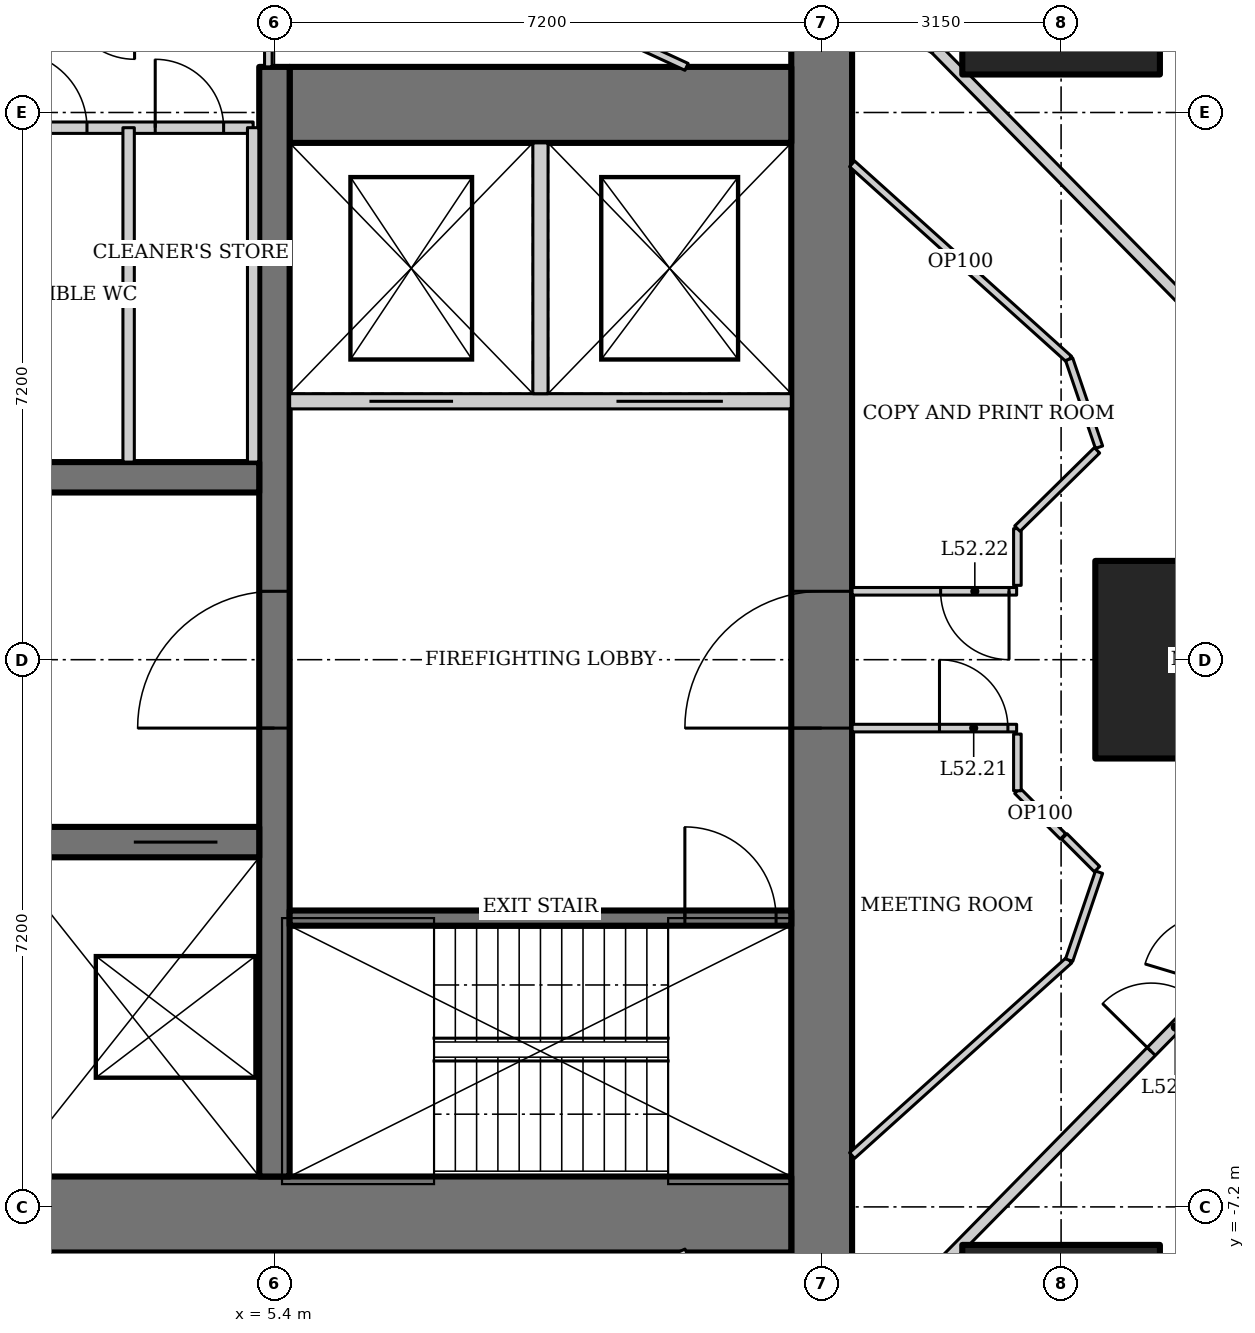
"""IFC4 building model, lengths in metres.
Left out: names, types, materials, properties, quantities, classifications, styles, units other than length and angle.
Written with IfcOpenShell. Run it as: python <this file> out.ifc"""

import sys

from ifc_helpers import new_model, si_unit, direction, frame, frame_2d, origin, origin_2d, place, context, subcontext, project, spatial, rectangle, hollow_rectangle, extrude, element, fill, save


model = new_model("IFC4")
c1 = context("Model", 3, precision=1e-05, world=origin(), true_north=direction((0.0, 1.0)))
c2 = subcontext(c1, "Body", "Model", "MODEL_VIEW")
j1 = project(units=[si_unit("LENGTHUNIT", "METRE"), si_unit("PLANEANGLEUNIT", "RADIAN")], contexts=[c1])
p1 = place(None, origin())
s1 = spatial("IfcSite", under=j1, at=p1, CompositionType="ELEMENT")
p2 = place(p1, origin())
s2 = spatial("IfcBuilding", under=s1, at=p2, CompositionType="ELEMENT")
p3 = place(p2, frame((0.0, 0.0, 224.2)))
s3 = spatial("IfcBuildingStorey", under=s2, at=p3, CompositionType="ELEMENT", Elevation=224.2)
for number, where, z_axis, x_axis in (
    (1, (17.5, 0.0, 0.0), (0.0, 0.0, 1.0), (1.0, 0.0, 0.0)),
    (2, (15.75, 9.0, 0.0), (0.0, 0.0, 1.0), (1.0, 0.0, 0.0)),
    (3, (15.75, -9.0, 0.0), (0.0, 0.0, 1.0), (1.0, 0.0, 0.0)),
):
    element("IfcColumn", number, at=place(p3, frame(where, z_axis=z_axis, x_axis=x_axis)), inside=s3, PredefinedType="COLUMN", context=c2, shape_type="SweptSolid", body=[
        extrude(hollow_rectangle(XDim=2.6, YDim=2.6, WallThickness=0.13, at=origin_2d()), origin(), (0.0, 0.0, 1.0), 4.2),
    ])
p4 = place(p3, frame((12.6, -13.0, 0.0), z_axis=(0.0, 0.0, 1.0), x_axis=(0.0, 1.0, 0.0)))
e4 = element("IfcWall", 4, at=p4, inside=s3, PredefinedType="SHEAR", context=c2, shape_type="SweptSolid", body=[
    extrude(rectangle(XDim=26.0, YDim=0.8, at=frame_2d((13.0, 0.0))), origin(), (0.0, 0.0, 1.0), 4.2),
])
p5 = place(p4, frame((12.1, 0.0, 0.0)))
e5 = element("IfcOpeningElement", 5, at=p5, cuts=e4, PredefinedType="OPENING", context=c2, shape_type="SweptSolid", body=[
    extrude(rectangle(XDim=1.8, YDim=2.1, at=frame_2d((0.9, 1.05))), frame((0.0, 0.41, 0.0), z_axis=(0.0, -1.0, 0.0), x_axis=(1.0, 0.0, 0.0)), (0.0, 0.0, 1.0), 0.82),
])
p6 = place(p3, frame((-12.2, -7.3, 0.0), z_axis=(0.0, 0.0, 1.0), x_axis=(1.0, 0.0, 0.0)))
e6 = element("IfcWall", 6, at=p6, inside=s3, PredefinedType="SHEAR", context=c2, shape_type="SweptSolid", body=[
    extrude(rectangle(XDim=24.4, YDim=1.0, at=frame_2d((12.2, 0.0))), origin(), (0.0, 0.0, 1.0), 4.2),
])
p7 = place(p3, frame((12.2, 7.3, 0.0), z_axis=(0.0, 0.0, 1.0), x_axis=(-1.0, 0.0, 0.0)))
e7 = element("IfcWall", 7, at=p7, inside=s3, PredefinedType="SHEAR", context=c2, shape_type="SweptSolid", body=[
    extrude(rectangle(XDim=6.6, YDim=1.0, at=frame_2d((3.3, 0.0))), origin(), (0.0, 0.0, 1.0), 4.2),
])
p8 = place(p3, frame((5.4, -6.8, 0.0), z_axis=(0.0, 0.0, 1.0), x_axis=(0.0, 1.0, 0.0)))
e8 = element("IfcWall", 8, at=p8, inside=s3, PredefinedType="SHEAR", context=c2, shape_type="SweptSolid", body=[
    extrude(rectangle(XDim=14.6, YDim=0.4, at=frame_2d((7.3, 0.0))), origin(), (0.0, 0.0, 1.0), 4.2),
])
p9 = place(p8, frame((5.9, 0.0, 0.0)))
e9 = element("IfcOpeningElement", 9, at=p9, cuts=e8, PredefinedType="OPENING", context=c2, shape_type="SweptSolid", body=[
    extrude(rectangle(XDim=1.8, YDim=2.1, at=frame_2d((0.9, 1.05))), frame((0.0, 0.21, 0.0), z_axis=(0.0, -1.0, 0.0), x_axis=(1.0, 0.0, 0.0)), (0.0, 0.0, 1.0), 0.42),
])
p10 = place(p3, frame((-5.2, -2.4, 0.0), z_axis=(0.0, 0.0, 1.0), x_axis=(1.0, 0.0, 0.0)))
e10 = element("IfcWall", 10, at=p10, inside=s3, PredefinedType="SHEAR", context=c2, shape_type="SweptSolid", body=[
    extrude(rectangle(XDim=10.4, YDim=0.4, at=frame_2d((5.2, 0.0))), origin(), (0.0, 0.0, 1.0), 4.2),
])
p11 = place(p10, frame((1.683, 0.0, 0.0)))
e11 = element("IfcOpeningElement", 11, at=p11, cuts=e10, PredefinedType="OPENING", context=c2, shape_type="SweptSolid", body=[
    extrude(rectangle(XDim=1.1, YDim=2.2, at=frame_2d((0.55, 1.1))), frame((0.0, 0.21, 0.0), z_axis=(0.0, -1.0, 0.0), x_axis=(1.0, 0.0, 0.0)), (0.0, 0.0, 1.0), 0.42),
])
p12 = place(p10, frame((5.217, 0.0, 0.0)))
e12 = element("IfcOpeningElement", 12, at=p12, cuts=e10, PredefinedType="OPENING", context=c2, shape_type="SweptSolid", body=[
    extrude(rectangle(XDim=1.1, YDim=2.2, at=frame_2d((0.55, 1.1))), frame((0.0, 0.21, 0.0), z_axis=(0.0, -1.0, 0.0), x_axis=(1.0, 0.0, 0.0)), (0.0, 0.0, 1.0), 0.42),
])
p13 = place(p10, frame((8.75, 0.0, 0.0)))
e13 = element("IfcOpeningElement", 13, at=p13, cuts=e10, PredefinedType="OPENING", context=c2, shape_type="SweptSolid", body=[
    extrude(rectangle(XDim=1.1, YDim=2.2, at=frame_2d((0.55, 1.1))), frame((0.0, 0.21, 0.0), z_axis=(0.0, -1.0, 0.0), x_axis=(1.0, 0.0, 0.0)), (0.0, 0.0, 1.0), 0.42),
])
p14 = place(p3, frame((5.2, 2.4, 0.0), z_axis=(0.0, 0.0, 1.0), x_axis=(-1.0, 0.0, 0.0)))
e14 = element("IfcWall", 14, at=p14, inside=s3, PredefinedType="SHEAR", context=c2, shape_type="SweptSolid", body=[
    extrude(rectangle(XDim=10.4, YDim=0.4, at=frame_2d((5.2, 0.0))), origin(), (0.0, 0.0, 1.0), 4.2),
])
p15 = place(p3, frame((5.6, -3.4, 0.0), z_axis=(0.0, 0.0, 1.0), x_axis=(1.0, 0.0, 0.0)))
e15 = element("IfcWall", 15, at=p15, inside=s3, PredefinedType="SHEAR", context=c2, shape_type="SweptSolid", body=[
    extrude(rectangle(XDim=6.6, YDim=0.2, at=frame_2d((3.3, 0.0))), origin(), (0.0, 0.0, 1.0), 4.2),
])
p16 = place(p15, frame((5.2, 0.0, 0.0)))
e16 = element("IfcOpeningElement", 16, at=p16, cuts=e15, PredefinedType="OPENING", context=c2, shape_type="SweptSolid", body=[
    extrude(rectangle(XDim=1.2, YDim=2.1, at=frame_2d((0.6, 1.05))), frame((0.0, 0.11, 0.0), z_axis=(0.0, -1.0, 0.0), x_axis=(1.0, 0.0, 0.0)), (0.0, 0.0, 1.0), 0.22),
])
p17 = place(p3, frame((12.2, 3.4, 0.0), z_axis=(0.0, 0.0, 1.0), x_axis=(-1.0, 0.0, 0.0)))
e17 = element("IfcWall", 17, at=p17, inside=s3, PredefinedType="SOLIDWALL", context=c2, shape_type="SweptSolid", body=[
    extrude(rectangle(XDim=6.6, YDim=0.2, at=frame_2d((3.3, 0.0))), origin(), (0.0, 0.0, 1.0), 4.2),
])
p18 = place(p17, frame((4.45, 0.0, 0.0)))
e18 = element("IfcOpeningElement", 18, at=p18, cuts=e17, PredefinedType="OPENING", context=c2, shape_type="SweptSolid", body=[
    extrude(rectangle(XDim=1.1, YDim=2.2, at=frame_2d((0.55, 1.1))), frame((0.0, 0.11, 0.0), z_axis=(0.0, -1.0, 0.0), x_axis=(1.0, 0.0, 0.0)), (0.0, 0.0, 1.0), 0.22),
])
p19 = place(p17, frame((0.9, 0.0, 0.0)))
e19 = element("IfcOpeningElement", 19, at=p19, cuts=e17, PredefinedType="OPENING", context=c2, shape_type="SweptSolid", body=[
    extrude(rectangle(XDim=1.4, YDim=2.2, at=frame_2d((0.7, 1.1))), frame((0.0, 0.11, 0.0), z_axis=(0.0, -1.0, 0.0), x_axis=(1.0, 0.0, 0.0)), (0.0, 0.0, 1.0), 0.22),
])
p20 = place(p3, frame((8.9, 3.5, 0.0), z_axis=(0.0, 0.0, 1.0), x_axis=(0.0, 1.0, 0.0)))
e20 = element("IfcWall", 20, at=p20, inside=s3, PredefinedType="SOLIDWALL", context=c2, shape_type="SweptSolid", body=[
    extrude(rectangle(XDim=3.3, YDim=0.2, at=frame_2d((1.65, 0.0))), origin(), (0.0, 0.0, 1.0), 4.2),
])
p21 = place(p3, frame((17.673, 4.406, 0.0), z_axis=(0.0, 0.0, 1.0), x_axis=(-0.701111216625, 0.713051934941, 0.0)))
e21 = element("IfcWall", 21, at=p21, inside=s3, PredefinedType="PARTITIONING", context=c2, shape_type="SweptSolid", body=[
    extrude(rectangle(XDim=5.112, YDim=0.15, at=frame_2d((2.556, 0.0))), origin(), (0.0, 0.0, 1.0), 4.05),
])
p22 = place(p3, frame((14.089, 8.051, 0.0), z_axis=(0.0, 0.0, 1.0), x_axis=(-0.886174439647, 0.463351769735, 0.0)))
e22 = element("IfcWall", 22, at=p22, inside=s3, PredefinedType="PARTITIONING", context=c2, shape_type="SweptSolid", body=[
    extrude(rectangle(XDim=4.735, YDim=0.15, at=frame_2d((2.367, 0.0))), origin(), (0.0, 0.0, 1.0), 4.05),
])
p23 = place(p3, frame((14.089, -8.051, 0.0), z_axis=(0.0, 0.0, 1.0), x_axis=(0.701111216625, 0.713051934941, 0.0)))
e23 = element("IfcWall", 23, at=p23, inside=s3, PredefinedType="PARTITIONING", context=c2, shape_type="SweptSolid", body=[
    extrude(rectangle(XDim=5.112, YDim=0.15, at=frame_2d((2.556, 0.0))), origin(), (0.0, 0.0, 1.0), 4.05),
])
p24 = place(p23, frame((4.061, 0.0, 0.0)))
e24 = element("IfcOpeningElement", 24, at=p24, cuts=e23, PredefinedType="OPENING", context=c2, shape_type="SweptSolid", body=[
    extrude(rectangle(XDim=0.9, YDim=2.1, at=frame_2d((0.45, 1.05))), frame((0.0, 0.085, 0.0), z_axis=(0.0, -1.0, 0.0), x_axis=(1.0, 0.0, 0.0)), (0.0, 0.0, 1.0), 0.17),
])
p25 = place(p3, frame((-5.12, 7.0, 0.0), z_axis=(0.0, 0.0, 1.0), x_axis=(1.0, 0.0, 0.0)))
e25 = element("IfcWall", 25, at=p25, inside=s3, PredefinedType="SOLIDWALL", context=c2, shape_type="SweptSolid", body=[
    extrude(rectangle(XDim=10.24, YDim=0.15, at=frame_2d((5.12, 0.0))), origin(), (0.0, 0.0, 1.0), 4.05),
])
p26 = place(p25, frame((1.2, 0.0, 0.0)))
e26 = element("IfcOpeningElement", 26, at=p26, cuts=e25, PredefinedType="OPENING", context=c2, shape_type="SweptSolid", body=[
    extrude(rectangle(XDim=0.9, YDim=2.1, at=frame_2d((0.45, 1.05))), frame((0.0, 0.085, 0.0), z_axis=(0.0, -1.0, 0.0), x_axis=(1.0, 0.0, 0.0)), (0.0, 0.0, 1.0), 0.17),
])
p27 = place(p25, frame((4.477, 0.0, 0.0)))
e27 = element("IfcOpeningElement", 27, at=p27, cuts=e25, PredefinedType="OPENING", context=c2, shape_type="SweptSolid", body=[
    extrude(rectangle(XDim=0.9, YDim=2.1, at=frame_2d((0.45, 1.05))), frame((0.0, 0.085, 0.0), z_axis=(0.0, -1.0, 0.0), x_axis=(1.0, 0.0, 0.0)), (0.0, 0.0, 1.0), 0.17),
])
p28 = place(p25, frame((7.054, 0.0, 0.0)))
e28 = element("IfcOpeningElement", 28, at=p28, cuts=e25, PredefinedType="OPENING", context=c2, shape_type="SweptSolid", body=[
    extrude(rectangle(XDim=1.0, YDim=2.1, at=frame_2d((0.5, 1.05))), frame((0.0, 0.085, 0.0), z_axis=(0.0, -1.0, 0.0), x_axis=(1.0, 0.0, 0.0)), (0.0, 0.0, 1.0), 0.17),
])
p29 = place(p25, frame((8.952, 0.0, 0.0)))
e29 = element("IfcOpeningElement", 29, at=p29, cuts=e25, PredefinedType="OPENING", context=c2, shape_type="SweptSolid", body=[
    extrude(rectangle(XDim=0.9, YDim=2.1, at=frame_2d((0.45, 1.05))), frame((0.0, 0.085, 0.0), z_axis=(0.0, -1.0, 0.0), x_axis=(1.0, 0.0, 0.0)), (0.0, 0.0, 1.0), 0.17),
])
for number, where, z_axis, x_axis in (
    (30, (5.12, 2.6, 0.0), (0.0, 0.0, 1.0), (0.0, 1.0, 0.0)),
    (31, (3.482, 2.6, 0.0), (0.0, 0.0, 1.0), (0.0, 1.0, 0.0)),
):
    element("IfcWall", number, at=place(p3, frame(where, z_axis=z_axis, x_axis=x_axis)), inside=s3, PredefinedType="SOLIDWALL", context=c2, shape_type="SweptSolid", body=[
        extrude(rectangle(XDim=4.4, YDim=0.15, at=frame_2d((2.2, 0.0))), origin(), (0.0, 0.0, 1.0), 4.05),
    ])
p30 = place(p3, frame((10.823, -7.8, 0.0), z_axis=(0.0, 0.0, 1.0), x_axis=(-0.907759689292, -0.419490579748, 0.0)))
e32 = element("IfcWall", 32, at=p30, inside=s3, PredefinedType="PARTITIONING", context=c2, shape_type="SweptSolid", body=[
    extrude(rectangle(XDim=2.506, YDim=0.1, at=frame_2d((1.253, 0.0))), origin(), (0.0, 0.0, 1.0), 4.05),
])
for number, where, z_axis, x_axis in (
    (33, (15.856, -3.953, 0.0), (0.0, 0.0, 1.0), (-0.743, -0.669, 0.0)),
    (34, (13.0, 6.524, 0.0), (0.0, 0.0, 1.0), (0.743, -0.669, 0.0)),
):
    element("IfcWall", number, at=place(p3, frame(where, z_axis=z_axis, x_axis=x_axis)), inside=s3, PredefinedType="PARTITIONING", context=c2, shape_type="SweptSolid", body=[
        extrude(rectangle(XDim=3.843, YDim=0.1, at=frame_2d((1.921, 0.0))), origin(), (0.0, 0.0, 1.0), 4.05),
    ])
p31 = place(p3, frame((5.32, 7.8, 0.0), z_axis=(0.0, 0.0, 1.0), x_axis=(0.0, 1.0, 0.0)))
e35 = element("IfcWall", 35, at=p31, inside=s3, PredefinedType="PARTITIONING", context=c2, shape_type="SweptSolid", body=[
    extrude(rectangle(XDim=1.0, YDim=0.1, at=frame_2d((0.5, 0.0))), origin(), (0.0, 0.0, 1.0), 4.05),
])
p32 = place(p3, frame((8.548, 8.851, 0.0), z_axis=(0.0, 0.0, 1.0), x_axis=(0.907759689292, -0.419490579748, 0.0)))
e36 = element("IfcWall", 36, at=p32, inside=s3, PredefinedType="PARTITIONING", context=c2, shape_type="SweptSolid", body=[
    extrude(rectangle(XDim=2.506, YDim=0.1, at=frame_2d((1.253, 0.0))), origin(), (0.0, 0.0, 1.0), 4.05),
])
p33 = place(p3, frame((13.0, -0.9, 0.0), z_axis=(0.0, 0.0, 1.0), x_axis=(1.0, 0.0, 0.0)))
e37 = element("IfcWall", 37, at=p33, inside=s3, PredefinedType="PARTITIONING", context=c2, shape_type="SweptSolid", body=[
    extrude(rectangle(XDim=2.165, YDim=0.1, at=frame_2d((1.083, 0.0))), origin(), (0.0, 0.0, 1.0), 4.05),
])
p34 = place(p33, frame((1.15, 0.0, 0.0)))
e38 = element("IfcOpeningElement", 38, at=p34, cuts=e37, PredefinedType="OPENING", context=c2, shape_type="SweptSolid", body=[
    extrude(rectangle(XDim=0.9, YDim=2.1, at=frame_2d((0.45, 1.05))), frame((0.0, 0.06, 0.0), z_axis=(0.0, -1.0, 0.0), x_axis=(1.0, 0.0, 0.0)), (0.0, 0.0, 1.0), 0.12),
])
for number, where, z_axis, x_axis in (
    (39, (16.249, -2.796, 0.0), (0.0, 0.0, 1.0), (-0.322, -0.947, 0.0)),
    (40, (15.856, 3.953, 0.0), (0.0, 0.0, 1.0), (0.322, -0.947, 0.0)),
):
    element("IfcWall", number, at=place(p3, frame(where, z_axis=z_axis, x_axis=x_axis)), inside=s3, PredefinedType="PARTITIONING", context=c2, shape_type="SweptSolid", body=[
        extrude(rectangle(XDim=1.223, YDim=0.1, at=frame_2d((0.611, 0.0))), origin(), (0.0, 0.0, 1.0), 4.05),
    ])
p35 = place(p3, frame((15.165, 0.9, 0.0), z_axis=(0.0, 0.0, 1.0), x_axis=(-1.0, 0.0, 0.0)))
e41 = element("IfcWall", 41, at=p35, inside=s3, PredefinedType="PARTITIONING", context=c2, shape_type="SweptSolid", body=[
    extrude(rectangle(XDim=2.165, YDim=0.1, at=frame_2d((1.083, 0.0))), origin(), (0.0, 0.0, 1.0), 4.05),
])
p36 = place(p35, frame((0.1, 0.0, 0.0)))
e42 = element("IfcOpeningElement", 42, at=p36, cuts=e41, PredefinedType="OPENING", context=c2, shape_type="SweptSolid", body=[
    extrude(rectangle(XDim=0.9, YDim=2.1, at=frame_2d((0.45, 1.05))), frame((0.0, 0.06, 0.0), z_axis=(0.0, -1.0, 0.0), x_axis=(1.0, 0.0, 0.0)), (0.0, 0.0, 1.0), 0.12),
])
p37 = place(p3, frame((15.775, -2.325, 0.0), z_axis=(0.0, 0.0, 1.0), x_axis=(-0.707106781187, 0.707106781187, 0.0)))
e43 = element("IfcWall", 43, at=p37, inside=s3, PredefinedType="PARTITIONING", context=c2, shape_type="SweptSolid", body=[
    extrude(rectangle(XDim=0.849, YDim=0.1, at=frame_2d((0.425, 0.0))), origin(), (0.0, 0.0, 1.0), 4.05),
])
p38 = place(p3, frame((15.175, -1.725, 0.0), z_axis=(0.0, 0.0, 1.0), x_axis=(0.0, 1.0, 0.0)))
e44 = element("IfcWall", 44, at=p38, inside=s3, PredefinedType="PARTITIONING", context=c2, shape_type="SweptSolid", body=[
    extrude(rectangle(XDim=0.746, YDim=0.1, at=frame_2d((0.373, 0.0))), origin(), (0.0, 0.0, 1.0), 4.05),
])
p39 = place(p3, frame((16.223, -2.755, 0.0), z_axis=(0.0, 0.0, 1.0), x_axis=(-0.707106781187, 0.707106781187, 0.0)))
e45 = element("IfcWall", 45, at=p39, inside=s3, PredefinedType="PARTITIONING", context=c2, shape_type="SweptSolid", body=[
    extrude(rectangle(XDim=0.608, YDim=0.1, at=frame_2d((0.304, 0.0))), origin(), (0.0, 0.0, 1.0), 4.05),
])
p40 = place(p3, frame((15.175, 0.978, 0.0), z_axis=(0.0, 0.0, 1.0), x_axis=(0.0, 1.0, 0.0)))
e46 = element("IfcWall", 46, at=p40, inside=s3, PredefinedType="PARTITIONING", context=c2, shape_type="SweptSolid", body=[
    extrude(rectangle(XDim=0.746, YDim=0.1, at=frame_2d((0.373, 0.0))), origin(), (0.0, 0.0, 1.0), 4.05),
])
p41 = place(p3, frame((15.175, 1.725, 0.0), z_axis=(0.0, 0.0, 1.0), x_axis=(0.712897698193, 0.701268045694, 0.0)))
e47 = element("IfcWall", 47, at=p41, inside=s3, PredefinedType="PARTITIONING", context=c2, shape_type="SweptSolid", body=[
    extrude(rectangle(XDim=1.469, YDim=0.1, at=frame_2d((0.735, 0.0))), origin(), (0.0, 0.0, 1.0), 4.05),
])
p42 = place(p9, origin())
e48 = element("IfcDoor", 48, at=p42, inside=s3, OperationType="DOUBLE_DOOR_DOUBLE_SWING", PredefinedType="DOOR", context=c2, shape_type="SweptSolid", body=[
    extrude(rectangle(XDim=1.8, YDim=2.1, at=frame_2d((0.9, 1.05))), frame((0.0, 0.025, 0.0), z_axis=(0.0, -1.0, 0.0), x_axis=(1.0, 0.0, 0.0)), (0.0, 0.0, 1.0), 0.05),
])
fill(e9, e48)
p43 = place(p16, origin())
e49 = element("IfcDoor", 49, at=p43, inside=s3, OperationType="SINGLE_SWING_RIGHT", PredefinedType="DOOR", context=c2, shape_type="SweptSolid", body=[
    extrude(rectangle(XDim=1.2, YDim=2.1, at=frame_2d((0.6, 1.05))), frame((0.0, 0.025, 0.0), z_axis=(0.0, -1.0, 0.0), x_axis=(1.0, 0.0, 0.0)), (0.0, 0.0, 1.0), 0.05),
])
fill(e16, e49)
p44 = place(p5, origin())
e50 = element("IfcDoor", 50, at=p44, inside=s3, OperationType="DOUBLE_DOOR_DOUBLE_SWING", PredefinedType="DOOR", context=c2, shape_type="SweptSolid", body=[
    extrude(rectangle(XDim=1.8, YDim=2.1, at=frame_2d((0.9, 1.05))), frame((0.0, 0.025, 0.0), z_axis=(0.0, -1.0, 0.0), x_axis=(1.0, 0.0, 0.0)), (0.0, 0.0, 1.0), 0.05),
])
fill(e5, e50)
p45 = place(p13, origin())
e51 = element("IfcDoor", 51, at=p45, inside=s3, OperationType="DOUBLE_DOOR_SLIDING", PredefinedType="DOOR", context=c2, shape_type="SweptSolid", body=[
    extrude(rectangle(XDim=1.1, YDim=2.2, at=frame_2d((0.55, 1.1))), frame((0.0, 0.025, 0.0), z_axis=(0.0, -1.0, 0.0), x_axis=(1.0, 0.0, 0.0)), (0.0, 0.0, 1.0), 0.05),
])
fill(e13, e51)
p46 = place(p18, origin())
e52 = element("IfcDoor", 52, at=p46, inside=s3, OperationType="DOUBLE_DOOR_SLIDING", PredefinedType="DOOR", context=c2, shape_type="SweptSolid", body=[
    extrude(rectangle(XDim=1.1, YDim=2.2, at=frame_2d((0.55, 1.1))), frame((0.0, 0.025, 0.0), z_axis=(0.0, -1.0, 0.0), x_axis=(1.0, 0.0, 0.0)), (0.0, 0.0, 1.0), 0.05),
])
fill(e18, e52)
p47 = place(p19, origin())
e53 = element("IfcDoor", 53, at=p47, inside=s3, OperationType="DOUBLE_DOOR_SLIDING", PredefinedType="DOOR", context=c2, shape_type="SweptSolid", body=[
    extrude(rectangle(XDim=1.4, YDim=2.2, at=frame_2d((0.7, 1.1))), frame((0.0, 0.025, 0.0), z_axis=(0.0, -1.0, 0.0), x_axis=(1.0, 0.0, 0.0)), (0.0, 0.0, 1.0), 0.05),
])
fill(e19, e53)
p48 = place(p28, origin())
e54 = element("IfcDoor", 54, at=p48, inside=s3, OperationType="SINGLE_SWING_LEFT", PredefinedType="DOOR", context=c2, shape_type="SweptSolid", body=[
    extrude(rectangle(XDim=1.0, YDim=2.1, at=frame_2d((0.5, 1.05))), frame((0.0, 0.025, 0.0), z_axis=(0.0, -1.0, 0.0), x_axis=(1.0, 0.0, 0.0)), (0.0, 0.0, 1.0), 0.05),
])
fill(e28, e54)
p49 = place(p29, origin())
e55 = element("IfcDoor", 55, at=p49, inside=s3, OperationType="SINGLE_SWING_LEFT", PredefinedType="DOOR", context=c2, shape_type="SweptSolid", body=[
    extrude(rectangle(XDim=0.9, YDim=2.1, at=frame_2d((0.45, 1.05))), frame((0.0, 0.025, 0.0), z_axis=(0.0, -1.0, 0.0), x_axis=(1.0, 0.0, 0.0)), (0.0, 0.0, 1.0), 0.05),
])
fill(e29, e55)
p50 = place(p34, origin())
e56 = element("IfcDoor", 56, at=p50, inside=s3, OperationType="SINGLE_SWING_LEFT", PredefinedType="DOOR", context=c2, shape_type="SweptSolid", body=[
    extrude(rectangle(XDim=0.9, YDim=2.1, at=frame_2d((0.45, 1.05))), frame((0.0, 0.025, 0.0), z_axis=(0.0, -1.0, 0.0), x_axis=(1.0, 0.0, 0.0)), (0.0, 0.0, 1.0), 0.05),
])
fill(e38, e56)
p51 = place(p36, origin())
e57 = element("IfcDoor", 57, at=p51, inside=s3, OperationType="SINGLE_SWING_LEFT", PredefinedType="DOOR", context=c2, shape_type="SweptSolid", body=[
    extrude(rectangle(XDim=0.9, YDim=2.1, at=frame_2d((0.45, 1.05))), frame((0.0, 0.025, 0.0), z_axis=(0.0, -1.0, 0.0), x_axis=(1.0, 0.0, 0.0)), (0.0, 0.0, 1.0), 0.05),
])
fill(e42, e57)
p52 = place(p24, origin())
e58 = element("IfcDoor", 58, at=p52, inside=s3, OperationType="SINGLE_SWING_LEFT", PredefinedType="DOOR", context=c2, shape_type="SweptSolid", body=[
    extrude(rectangle(XDim=0.9, YDim=2.1, at=frame_2d((0.45, 1.05))), frame((0.0, 0.025, 0.0), z_axis=(0.0, -1.0, 0.0), x_axis=(1.0, 0.0, 0.0)), (0.0, 0.0, 1.0), 0.05),
])
fill(e24, e58)
save(model, sys.argv[1])
